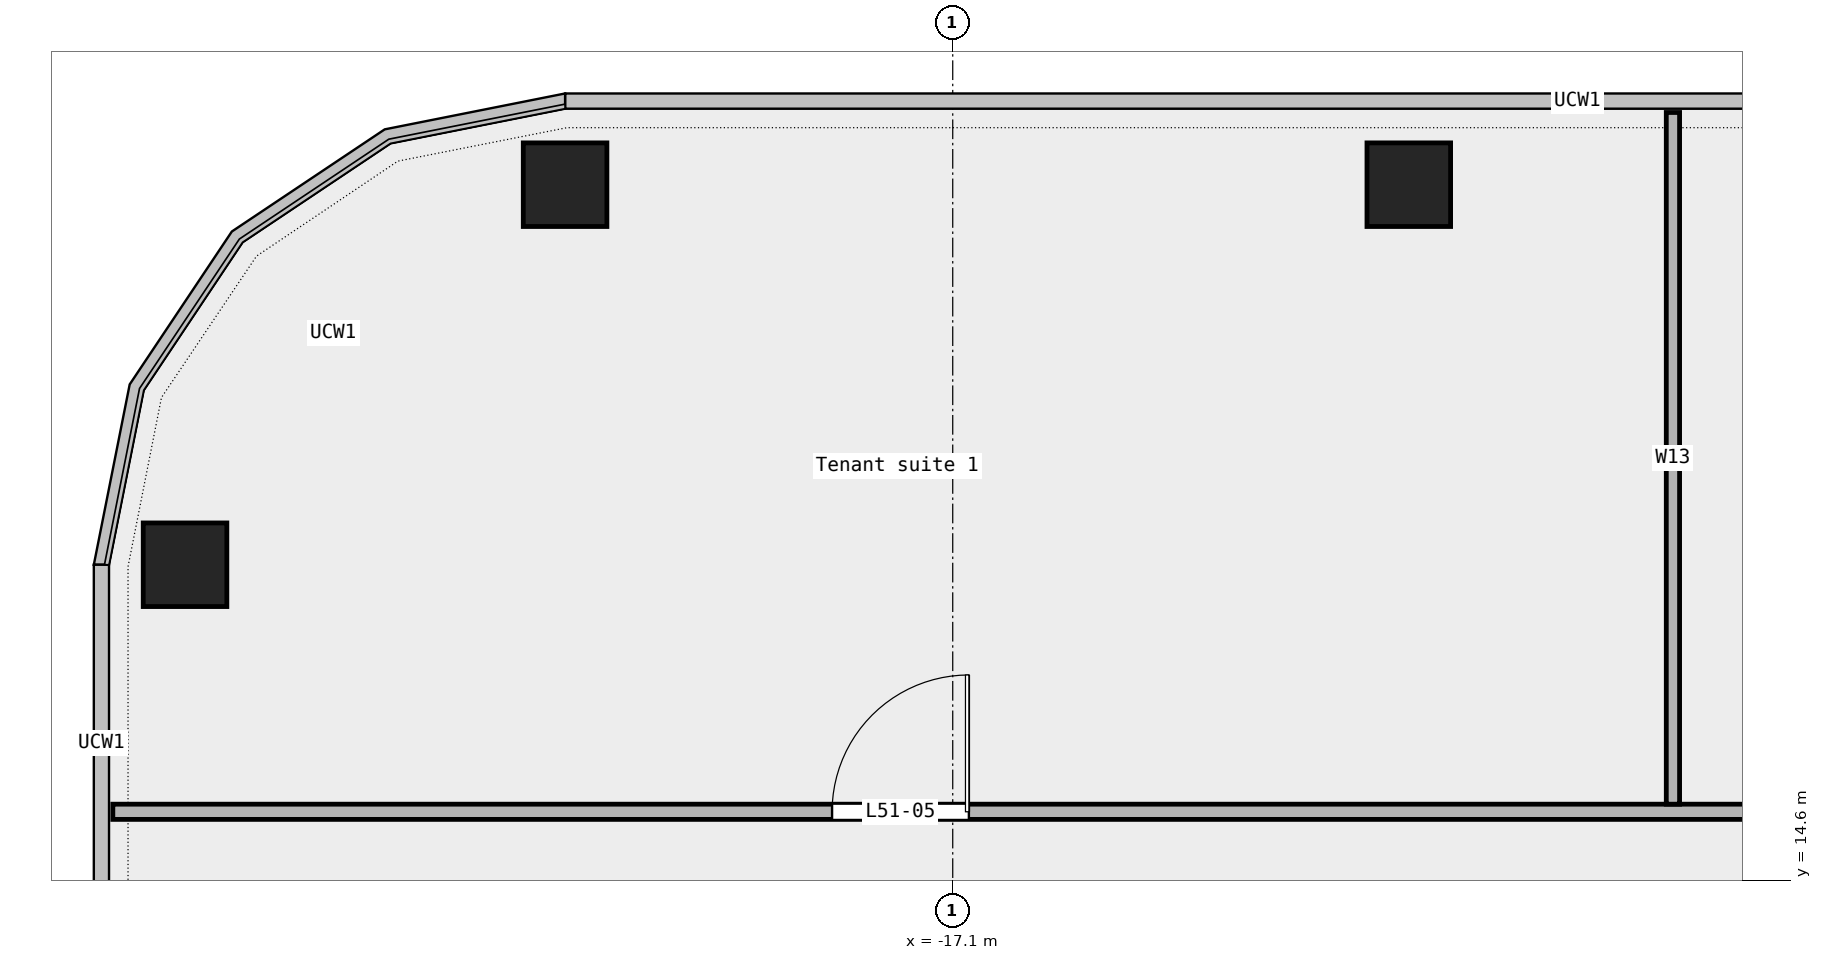
"""IFC4 building model, lengths in metres.
Left out: names, types, materials, properties, quantities, classifications, styles, units other than length and angle.
Written with IfcOpenShell. Run it as: python <this file> out.ifc"""

import sys

from ifc_helpers import new_model, si_unit, direction, frame, frame_2d, origin, origin_2d, place, context, subcontext, project, spatial, rectangle, extrude, element, fill, save


model = new_model("IFC4")
c1 = context("Model", 3, precision=1e-05, world=origin(), true_north=direction((0.0, 1.0)))
c2 = subcontext(c1, "Body", "Model", "MODEL_VIEW")
j1 = project(units=[si_unit("LENGTHUNIT", "METRE"), si_unit("PLANEANGLEUNIT", "RADIAN")], contexts=[c1])
p1 = place(None, origin())
s1 = spatial("IfcSite", under=j1, at=p1, CompositionType="ELEMENT")
p2 = place(p1, origin())
s2 = spatial("IfcBuilding", under=s1, at=p2, CompositionType="ELEMENT")
p3 = place(p2, frame((0.0, 0.0, 239.0)))
s3 = spatial("IfcBuildingStorey", under=s2, at=p3, CompositionType="ELEMENT", Elevation=239.0)
for number, where, z_axis, x_axis in (
    (1, (-11.1, 23.75, 0.0), (0.0, 0.0, 1.0), (1.0, 0.0, 0.0)),
    (2, (-22.2, 23.75, 0.0), (0.0, 0.0, 1.0), (1.0, 0.0, 0.0)),
    (3, (-27.2, 18.75, 0.0), (0.0, 0.0, 1.0), (1.0, 0.0, 0.0)),
):
    element("IfcColumn", number, at=place(p3, frame(where, z_axis=z_axis, x_axis=x_axis)), inside=s3, PredefinedType="COLUMN", context=c2, shape_type="SweptSolid", body=[
        extrude(rectangle(XDim=1.1, YDim=1.1, at=origin_2d()), origin(), (0.0, 0.0, 1.0), 3.6),
    ])
p4 = place(p3, frame((-28.15, 15.5, 0.0), z_axis=(0.0, 0.0, 1.0), x_axis=(1.0, 0.0, 0.0)))
e4 = element("IfcWall", 4, at=p4, inside=s3, PredefinedType="PARTITIONING", context=c2, shape_type="SweptSolid", body=[
    extrude(rectangle(XDim=45.91, YDim=0.2, at=frame_2d((22.955, 0.0))), origin(), (0.0, 0.0, 1.0), 3.6),
])
p5 = place(p4, frame((38.5, 0.0, 0.0)))
e5 = element("IfcOpeningElement", 5, at=p5, cuts=e4, PredefinedType="OPENING", context=c2, shape_type="SweptSolid", body=[
    extrude(rectangle(XDim=1.5, YDim=2.1, at=frame_2d((0.75, 1.05))), frame((0.0, 0.112, 0.0), z_axis=(0.0, -1.0, 0.0), x_axis=(1.0, 0.0, 0.0)), (0.0, 0.0, 1.0), 0.224),
])
p6 = place(p4, frame((9.462, 0.0, 0.0)))
e6 = element("IfcOpeningElement", 6, at=p6, cuts=e4, PredefinedType="OPENING", context=c2, shape_type="SweptSolid", body=[
    extrude(rectangle(XDim=1.8, YDim=2.1, at=frame_2d((0.9, 1.05))), frame((0.0, 0.112, 0.0), z_axis=(0.0, -1.0, 0.0), x_axis=(1.0, 0.0, 0.0)), (0.0, 0.0, 1.0), 0.224),
])
p7 = place(p4, frame((25.808, 0.0, 0.0)))
e7 = element("IfcOpeningElement", 7, at=p7, cuts=e4, PredefinedType="OPENING", context=c2, shape_type="SweptSolid", body=[
    extrude(rectangle(XDim=1.5, YDim=2.1, at=frame_2d((0.75, 1.05))), frame((0.0, 0.112, 0.0), z_axis=(0.0, -1.0, 0.0), x_axis=(1.0, 0.0, 0.0)), (0.0, 0.0, 1.0), 0.224),
])
p8 = place(p3, frame((-7.625, 15.6, 0.0), z_axis=(0.0, 0.0, 1.0), x_axis=(0.0, 1.0, 0.0)))
e8 = element("IfcWall", 8, at=p8, inside=s3, PredefinedType="PARTITIONING", context=c2, shape_type="SweptSolid", body=[
    extrude(rectangle(XDim=9.1, YDim=0.175, at=frame_2d((4.55, 0.0))), origin(), (0.0, 0.0, 1.0), 3.6),
])
p9 = place(p6, origin())
e9 = element("IfcDoor", 9, at=p9, inside=s3, OperationType="DOUBLE_DOOR_SINGLE_SWING", PredefinedType="DOOR", context=c2, shape_type="SweptSolid", body=[
    extrude(rectangle(XDim=1.8, YDim=2.1, at=frame_2d((0.9, 1.05))), frame((0.0, 0.025, 0.0), z_axis=(0.0, -1.0, 0.0), x_axis=(1.0, 0.0, 0.0)), (0.0, 0.0, 1.0), 0.05),
])
fill(e6, e9)
save(model, sys.argv[1])
